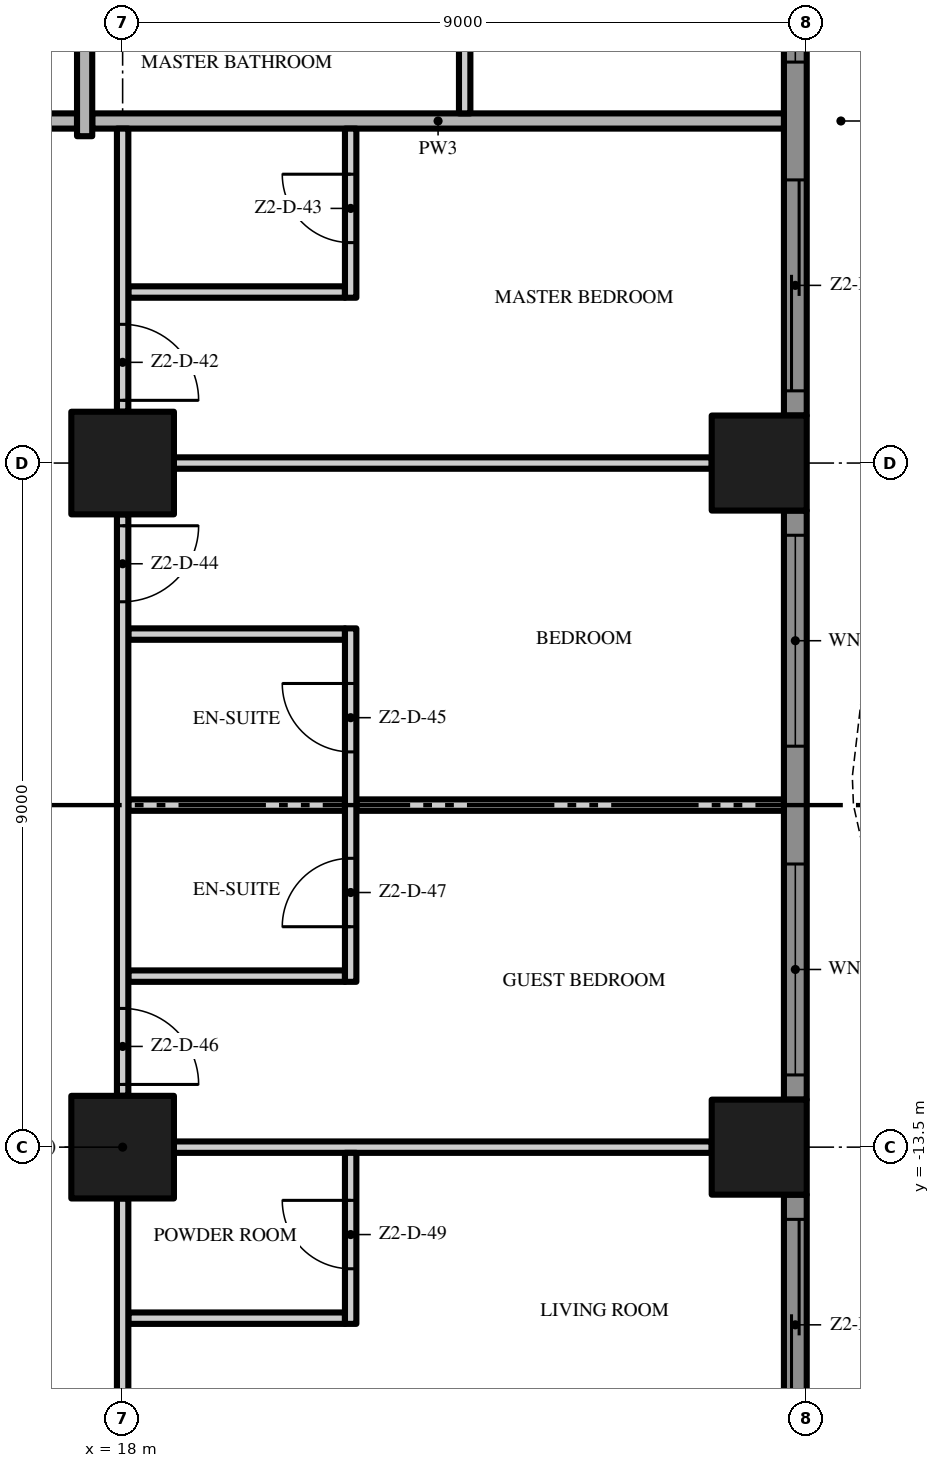
"""IFC4 building model, lengths in metres.
Left out: names, types, materials, properties, quantities, classifications, styles, units other than length and angle.
Written with IfcOpenShell. Run it as: python <this file> out.ifc"""

import sys

from ifc_helpers import new_model, si_unit, direction, frame, frame_2d, origin, origin_2d, place, context, subcontext, project, spatial, polyline, rectangle, outline, extrude, element, fill, save


model = new_model("IFC4")
c1 = context("Model", 3, precision=1e-05, world=origin(), true_north=direction((0.0, 1.0)))
c2 = subcontext(c1, "Body", "Model", "MODEL_VIEW")
j1 = project(units=[si_unit("LENGTHUNIT", "METRE"), si_unit("PLANEANGLEUNIT", "RADIAN")], contexts=[c1])
p1 = place(None, origin())
s1 = spatial("IfcSite", under=j1, at=p1, CompositionType="ELEMENT")
p2 = place(p1, origin())
s2 = spatial("IfcBuilding", under=s1, at=p2, CompositionType="ELEMENT")
p3 = place(p2, frame((0.0, 0.0, 111.2)))
s3 = spatial("IfcBuildingStorey", under=s2, at=p3, CompositionType="ELEMENT", Elevation=111.2)
for number, where, z_axis, x_axis in (
    (1, (18.0, -13.5, 0.0), (0.0, 0.0, 1.0), (1.0, 0.0, 0.0)),
    (2, (18.0, -4.5, 0.0), (0.0, 0.0, 1.0), (1.0, 0.0, 0.0)),
):
    element("IfcColumn", number, at=place(p3, frame(where, z_axis=z_axis, x_axis=x_axis)), inside=s3, PredefinedType="COLUMN", context=c2, shape_type="SweptSolid", body=[
        extrude(rectangle(XDim=1.35, YDim=1.35, at=origin_2d()), origin(), (0.0, 0.0, 1.0), 3.5),
    ])
for number, where, z_axis, x_axis in (
    (3, (26.375, -13.5, 0.0), (0.0, 0.0, 1.0), (1.0, 0.0, 0.0)),
    (4, (26.375, -4.5, 0.0), (0.0, 0.0, 1.0), (1.0, 0.0, 0.0)),
):
    element("IfcColumn", number, at=place(p3, frame(where, z_axis=z_axis, x_axis=x_axis)), inside=s3, PredefinedType="COLUMN", context=c2, shape_type="SweptSolid", body=[
        extrude(rectangle(XDim=1.25, YDim=1.25, at=origin_2d()), origin(), (0.0, 0.0, 1.0), 3.5),
    ])
p4 = place(p3, frame((26.85, -14.125, 0.0), z_axis=(0.0, 0.0, 1.0), x_axis=(0.0, -1.0, 0.0)))
e5 = element("IfcWall", 5, at=p4, inside=s3, PredefinedType="SOLIDWALL", context=c2, shape_type="SweptSolid", body=[
    extrude(rectangle(XDim=3.575, YDim=0.3, at=frame_2d((1.788, 0.0))), origin(), (0.0, 0.0, 1.0), 3.5),
])
p5 = place(p4, frame((0.325, 0.0, 0.0)))
e6 = element("IfcOpeningElement", 6, at=p5, cuts=e5, PredefinedType="OPENING", context=c2, shape_type="SweptSolid", body=[
    extrude(rectangle(XDim=2.775, YDim=2.4, at=frame_2d((1.387, 1.2))), frame((0.0, 0.16, 0.0), z_axis=(0.0, -1.0, 0.0), x_axis=(1.0, 0.0, 0.0)), (0.0, 0.0, 1.0), 0.32),
])
p6 = place(p3, frame((26.85, -5.125, 0.0), z_axis=(0.0, 0.0, 1.0), x_axis=(0.0, -1.0, 0.0)))
e7 = element("IfcWall", 7, at=p6, inside=s3, PredefinedType="SOLIDWALL", context=c2, shape_type="SweptSolid", body=[
    extrude(rectangle(XDim=7.75, YDim=0.3, at=frame_2d((3.875, 0.0))), origin(), (0.0, 0.0, 1.0), 3.5),
])
p7 = place(p6, frame((4.65, 0.0, 0.45)))
e8 = element("IfcOpeningElement", 8, at=p7, cuts=e7, PredefinedType="OPENING", context=c2, shape_type="SweptSolid", body=[
    extrude(rectangle(XDim=2.775, YDim=2.65, at=frame_2d((1.387, 1.325))), frame((0.0, 0.16, 0.0), z_axis=(0.0, -1.0, 0.0), x_axis=(1.0, 0.0, 0.0)), (0.0, 0.0, 1.0), 0.32),
])
p8 = place(p6, frame((0.325, 0.0, 0.45)))
e9 = element("IfcOpeningElement", 9, at=p8, cuts=e7, PredefinedType="OPENING", context=c2, shape_type="SweptSolid", body=[
    extrude(rectangle(XDim=2.775, YDim=2.65, at=frame_2d((1.387, 1.325))), frame((0.0, 0.16, 0.0), z_axis=(0.0, -1.0, 0.0), x_axis=(1.0, 0.0, 0.0)), (0.0, 0.0, 1.0), 0.32),
])
p9 = place(p3, frame((26.85, 3.875, 0.0), z_axis=(0.0, 0.0, 1.0), x_axis=(0.0, -1.0, 0.0)))
e10 = element("IfcWall", 10, at=p9, inside=s3, PredefinedType="SOLIDWALL", context=c2, shape_type="SweptSolid", body=[
    extrude(rectangle(XDim=7.75, YDim=0.3, at=frame_2d((3.875, 0.0))), origin(), (0.0, 0.0, 1.0), 3.5),
])
p10 = place(p9, frame((4.65, 0.0, 0.0)))
e11 = element("IfcOpeningElement", 11, at=p10, cuts=e10, PredefinedType="OPENING", context=c2, shape_type="SweptSolid", body=[
    extrude(rectangle(XDim=2.775, YDim=2.4, at=frame_2d((1.387, 1.2))), frame((0.0, 0.16, 0.0), z_axis=(0.0, -1.0, 0.0), x_axis=(1.0, 0.0, 0.0)), (0.0, 0.0, 1.0), 0.32),
])
p11 = place(p9, frame((0.325, 0.0, 0.45)))
e12 = element("IfcOpeningElement", 12, at=p11, cuts=e10, PredefinedType="OPENING", context=c2, shape_type="SweptSolid", body=[
    extrude(rectangle(XDim=2.775, YDim=2.65, at=frame_2d((1.387, 1.325))), frame((0.0, 0.16, 0.0), z_axis=(0.0, -1.0, 0.0), x_axis=(1.0, 0.0, 0.0)), (0.0, 0.0, 1.0), 0.32),
])
p12 = place(p3, origin())
e13 = element("IfcWall", 13, at=p12, inside=s3, PredefinedType="USERDEFINED", context=c2, shape_type="SweptSolid", body=[
    extrude(outline(polyline([(29.649, -18.0), (29.985, -16.5), (30.0, -16.125), (29.869, -15.0), (29.345, -13.5), (28.612, -12.0), (27.951, -10.5), (27.615, -9.0), (27.6, -8.625), (27.731, -7.5), (28.255, -6.0), (28.988, -4.5), (29.649, -3.0), (29.985, -1.5), (30.0, -1.125), (29.869, 0.0), (29.345, 1.5), (28.612, 3.0), (27.951, 4.5), (27.615, 6.0), (27.6, 6.375), (27.731, 7.5), (28.255, 9.0), (28.988, 10.5), (29.649, 12.0), (29.985, 13.5), (30.0, 13.875), (29.869, 15.0), (29.345, 16.5), (28.612, 18.0), (28.388, 17.89), (29.114, 16.404), (29.624, 14.944), (29.749, 13.865), (29.736, 13.533), (29.41, 12.079), (28.761, 10.605), (28.024, 9.096), (27.486, 7.556), (27.349, 6.385), (27.366, 5.967), (27.713, 4.421), (28.385, 2.895), (29.114, 1.404), (29.624, -0.056), (29.749, -1.135), (29.736, -1.467), (29.41, -2.921), (28.761, -4.395), (28.024, -5.904), (27.486, -7.444), (27.349, -8.615), (27.366, -9.033), (27.713, -10.579), (28.385, -12.105), (29.114, -13.596), (29.624, -15.056), (29.749, -16.135), (29.736, -16.467), (29.405, -17.945), (29.649, -18.0)])), origin(), (0.0, 0.0, 1.0), 0.9),
])
p13 = place(p3, frame((18.075, -15.75, 0.0), z_axis=(0.0, 0.0, 1.0), x_axis=(1.0, 0.0, 0.0)))
e14 = element("IfcWall", 14, at=p13, inside=s3, PredefinedType="PARTITIONING", context=c2, shape_type="SweptSolid", body=[
    extrude(rectangle(XDim=2.85, YDim=0.15, at=frame_2d((1.425, 0.0))), origin(), (0.0, 0.0, 1.0), 3.5),
])
p14 = place(p3, frame((18.675, -13.5, 0.0), z_axis=(0.0, 0.0, 1.0), x_axis=(1.0, 0.0, 0.0)))
e15 = element("IfcWall", 15, at=p14, inside=s3, PredefinedType="PARTITIONING", context=c2, shape_type="SweptSolid", body=[
    extrude(rectangle(XDim=7.075, YDim=0.15, at=frame_2d((3.538, 0.0))), origin(), (0.0, 0.0, 1.0), 3.5),
])
for number, where, z_axis, x_axis in (
    (16, (18.075, -11.25, 0.0), (0.0, 0.0, 1.0), (1.0, 0.0, 0.0)),
    (17, (18.075, -9.0, 0.0), (0.0, 0.0, 1.0), (1.0, 0.0, 0.0)),
):
    element("IfcWall", number, at=place(p3, frame(where, z_axis=z_axis, x_axis=x_axis)), inside=s3, PredefinedType="PARTITIONING", context=c2, shape_type="SweptSolid", body=[
        extrude(rectangle(XDim=2.85, YDim=0.15, at=frame_2d((1.425, 0.0))), origin(), (0.0, 0.0, 1.0), 3.5),
    ])
p15 = place(p3, frame((21.075, -9.0, 0.0), z_axis=(0.0, 0.0, 1.0), x_axis=(1.0, 0.0, 0.0)))
e18 = element("IfcWall", 18, at=p15, inside=s3, PredefinedType="PARTITIONING", context=c2, shape_type="SweptSolid", body=[
    extrude(rectangle(XDim=5.625, YDim=0.15, at=frame_2d((2.812, 0.0))), origin(), (0.0, 0.0, 1.0), 3.5),
])
p16 = place(p3, frame((18.075, -6.75, 0.0), z_axis=(0.0, 0.0, 1.0), x_axis=(1.0, 0.0, 0.0)))
e19 = element("IfcWall", 19, at=p16, inside=s3, PredefinedType="PARTITIONING", context=c2, shape_type="SweptSolid", body=[
    extrude(rectangle(XDim=2.85, YDim=0.15, at=frame_2d((1.425, 0.0))), origin(), (0.0, 0.0, 1.0), 3.5),
])
p17 = place(p3, frame((18.675, -4.5, 0.0), z_axis=(0.0, 0.0, 1.0), x_axis=(1.0, 0.0, 0.0)))
e20 = element("IfcWall", 20, at=p17, inside=s3, PredefinedType="PARTITIONING", context=c2, shape_type="SweptSolid", body=[
    extrude(rectangle(XDim=7.075, YDim=0.15, at=frame_2d((3.538, 0.0))), origin(), (0.0, 0.0, 1.0), 3.5),
])
p18 = place(p3, frame((18.075, -2.25, 0.0), z_axis=(0.0, 0.0, 1.0), x_axis=(1.0, 0.0, 0.0)))
e21 = element("IfcWall", 21, at=p18, inside=s3, PredefinedType="PARTITIONING", context=c2, shape_type="SweptSolid", body=[
    extrude(rectangle(XDim=2.85, YDim=0.15, at=frame_2d((1.425, 0.0))), origin(), (0.0, 0.0, 1.0), 3.5),
])
p19 = place(p3, frame((4.6, 0.0, 0.0), z_axis=(0.0, 0.0, 1.0), x_axis=(1.0, 0.0, 0.0)))
e22 = element("IfcWall", 22, at=p19, inside=s3, PredefinedType="PARTITIONING", context=c2, shape_type="SweptSolid", body=[
    extrude(rectangle(XDim=12.8, YDim=0.2, at=frame_2d((6.4, 0.0))), origin(), (0.0, 0.0, 1.0), 3.5),
])
p20 = place(p3, frame((17.6, 0.0, 0.0), z_axis=(0.0, 0.0, 1.0), x_axis=(1.0, 0.0, 0.0)))
e23 = element("IfcWall", 23, at=p20, inside=s3, PredefinedType="PARTITIONING", context=c2, shape_type="SweptSolid", body=[
    extrude(rectangle(XDim=9.1, YDim=0.2, at=frame_2d((4.55, 0.0))), origin(), (0.0, 0.0, 1.0), 3.5),
])
p21 = place(p3, frame((17.5, -0.2, 0.0), z_axis=(0.0, 0.0, 1.0), x_axis=(0.0, 1.0, 0.0)))
e24 = element("IfcWall", 24, at=p21, inside=s3, PredefinedType="PARTITIONING", context=c2, shape_type="SweptSolid", body=[
    extrude(rectangle(XDim=4.025, YDim=0.2, at=frame_2d((2.013, 0.0))), origin(), (0.0, 0.0, 1.0), 3.5),
])
p22 = place(p3, frame((18.0, -14.175, 0.0), z_axis=(0.0, 0.0, 1.0), x_axis=(0.0, -1.0, 0.0)))
e25 = element("IfcWall", 25, at=p22, inside=s3, PredefinedType="PARTITIONING", context=c2, shape_type="SweptSolid", body=[
    extrude(rectangle(XDim=7.075, YDim=0.15, at=frame_2d((3.538, 0.0))), origin(), (0.0, 0.0, 1.0), 3.5),
])
p23 = place(p22, frame((4.075, 0.0, 0.0)))
e26 = element("IfcOpeningElement", 26, at=p23, cuts=e25, PredefinedType="OPENING", context=c2, shape_type="SweptSolid", body=[
    extrude(rectangle(XDim=1.8, YDim=2.4, at=frame_2d((0.9, 1.2))), frame((0.0, 0.085, 0.0), z_axis=(0.0, -1.0, 0.0), x_axis=(1.0, 0.0, 0.0)), (0.0, 0.0, 1.0), 0.17),
])
p24 = place(p3, frame((18.0, -5.175, 0.0), z_axis=(0.0, 0.0, 1.0), x_axis=(0.0, -1.0, 0.0)))
e27 = element("IfcWall", 27, at=p24, inside=s3, PredefinedType="PARTITIONING", context=c2, shape_type="SweptSolid", body=[
    extrude(rectangle(XDim=7.65, YDim=0.15, at=frame_2d((3.825, 0.0))), origin(), (0.0, 0.0, 1.0), 3.5),
])
p25 = place(p24, frame((0.15, 0.0, 0.0)))
e28 = element("IfcOpeningElement", 28, at=p25, cuts=e27, PredefinedType="OPENING", context=c2, shape_type="SweptSolid", body=[
    extrude(rectangle(XDim=1.0, YDim=2.4, at=frame_2d((0.5, 1.2))), frame((0.0, 0.085, 0.0), z_axis=(0.0, -1.0, 0.0), x_axis=(1.0, 0.0, 0.0)), (0.0, 0.0, 1.0), 0.17),
])
p26 = place(p24, frame((6.5, 0.0, 0.0)))
e29 = element("IfcOpeningElement", 29, at=p26, cuts=e27, PredefinedType="OPENING", context=c2, shape_type="SweptSolid", body=[
    extrude(rectangle(XDim=1.0, YDim=2.4, at=frame_2d((0.5, 1.2))), frame((0.0, 0.085, 0.0), z_axis=(0.0, -1.0, 0.0), x_axis=(1.0, 0.0, 0.0)), (0.0, 0.0, 1.0), 0.17),
])
p27 = place(p3, frame((18.0, -0.1, 0.0), z_axis=(0.0, 0.0, 1.0), x_axis=(0.0, -1.0, 0.0)))
e30 = element("IfcWall", 30, at=p27, inside=s3, PredefinedType="PARTITIONING", context=c2, shape_type="SweptSolid", body=[
    extrude(rectangle(XDim=3.725, YDim=0.15, at=frame_2d((1.863, 0.0))), origin(), (0.0, 0.0, 1.0), 3.5),
])
p28 = place(p27, frame((2.575, 0.0, 0.0)))
e31 = element("IfcOpeningElement", 31, at=p28, cuts=e30, PredefinedType="OPENING", context=c2, shape_type="SweptSolid", body=[
    extrude(rectangle(XDim=1.0, YDim=2.4, at=frame_2d((0.5, 1.2))), frame((0.0, 0.085, 0.0), z_axis=(0.0, -1.0, 0.0), x_axis=(1.0, 0.0, 0.0)), (0.0, 0.0, 1.0), 0.17),
])
p29 = place(p3, frame((21.0, -15.825, 0.0), z_axis=(0.0, 0.0, 1.0), x_axis=(0.0, 1.0, 0.0)))
e32 = element("IfcWall", 32, at=p29, inside=s3, PredefinedType="PARTITIONING", context=c2, shape_type="SweptSolid", body=[
    extrude(rectangle(XDim=2.25, YDim=0.15, at=frame_2d((1.125, 0.0))), origin(), (0.0, 0.0, 1.0), 3.5),
])
p30 = place(p29, frame((0.725, 0.0, 0.0)))
e33 = element("IfcOpeningElement", 33, at=p30, cuts=e32, PredefinedType="OPENING", context=c2, shape_type="SweptSolid", body=[
    extrude(rectangle(XDim=0.9, YDim=2.1, at=frame_2d((0.45, 1.05))), frame((0.0, 0.085, 0.0), z_axis=(0.0, -1.0, 0.0), x_axis=(1.0, 0.0, 0.0)), (0.0, 0.0, 1.0), 0.17),
])
p31 = place(p3, frame((21.0, -11.325, 0.0), z_axis=(0.0, 0.0, 1.0), x_axis=(0.0, 1.0, 0.0)))
e34 = element("IfcWall", 34, at=p31, inside=s3, PredefinedType="PARTITIONING", context=c2, shape_type="SweptSolid", body=[
    extrude(rectangle(XDim=4.65, YDim=0.15, at=frame_2d((2.325, 0.0))), origin(), (0.0, 0.0, 1.0), 3.5),
])
p32 = place(p31, frame((3.025, 0.0, 0.0)))
e35 = element("IfcOpeningElement", 35, at=p32, cuts=e34, PredefinedType="OPENING", context=c2, shape_type="SweptSolid", body=[
    extrude(rectangle(XDim=0.9, YDim=2.1, at=frame_2d((0.45, 1.05))), frame((0.0, 0.085, 0.0), z_axis=(0.0, -1.0, 0.0), x_axis=(1.0, 0.0, 0.0)), (0.0, 0.0, 1.0), 0.17),
])
p33 = place(p31, frame((0.725, 0.0, 0.0)))
e36 = element("IfcOpeningElement", 36, at=p33, cuts=e34, PredefinedType="OPENING", context=c2, shape_type="SweptSolid", body=[
    extrude(rectangle(XDim=0.9, YDim=2.1, at=frame_2d((0.45, 1.05))), frame((0.0, 0.085, 0.0), z_axis=(0.0, -1.0, 0.0), x_axis=(1.0, 0.0, 0.0)), (0.0, 0.0, 1.0), 0.17),
])
p34 = place(p3, frame((21.0, -2.325, 0.0), z_axis=(0.0, 0.0, 1.0), x_axis=(0.0, 1.0, 0.0)))
e37 = element("IfcWall", 37, at=p34, inside=s3, PredefinedType="PARTITIONING", context=c2, shape_type="SweptSolid", body=[
    extrude(rectangle(XDim=2.225, YDim=0.15, at=frame_2d((1.113, 0.0))), origin(), (0.0, 0.0, 1.0), 3.5),
])
p35 = place(p34, frame((0.725, 0.0, 0.0)))
e38 = element("IfcOpeningElement", 38, at=p35, cuts=e37, PredefinedType="OPENING", context=c2, shape_type="SweptSolid", body=[
    extrude(rectangle(XDim=0.9, YDim=2.1, at=frame_2d((0.45, 1.05))), frame((0.0, 0.085, 0.0), z_axis=(0.0, -1.0, 0.0), x_axis=(1.0, 0.0, 0.0)), (0.0, 0.0, 1.0), 0.17),
])
p36 = place(p3, frame((22.5, 17.375, 0.0), z_axis=(0.0, 0.0, 1.0), x_axis=(0.0, -1.0, 0.0)))
e39 = element("IfcWall", 39, at=p36, inside=s3, PredefinedType="PARTITIONING", context=c2, shape_type="SweptSolid", body=[
    extrude(rectangle(XDim=17.275, YDim=0.15, at=frame_2d((8.637, 0.0))), origin(), (0.0, 0.0, 1.0), 3.5),
])
p37 = place(p36, frame((14.625, 0.0, 0.0)))
e40 = element("IfcOpeningElement", 40, at=p37, cuts=e39, PredefinedType="OPENING", context=c2, shape_type="SweptSolid", body=[
    extrude(rectangle(XDim=1.0, YDim=2.4, at=frame_2d((0.5, 1.2))), frame((0.0, 0.085, 0.0), z_axis=(0.0, -1.0, 0.0), x_axis=(1.0, 0.0, 0.0)), (0.0, 0.0, 1.0), 0.17),
])
p38 = place(p36, frame((9.025, 0.0, 0.0)))
e41 = element("IfcOpeningElement", 41, at=p38, cuts=e39, PredefinedType="OPENING", context=c2, shape_type="SweptSolid", body=[
    extrude(rectangle(XDim=1.0, YDim=2.4, at=frame_2d((0.5, 1.2))), frame((0.0, 0.085, 0.0), z_axis=(0.0, -1.0, 0.0), x_axis=(1.0, 0.0, 0.0)), (0.0, 0.0, 1.0), 0.17),
])
p39 = place(p36, frame((6.775, 0.0, 0.0)))
e42 = element("IfcOpeningElement", 42, at=p39, cuts=e39, PredefinedType="OPENING", context=c2, shape_type="SweptSolid", body=[
    extrude(rectangle(XDim=1.0, YDim=2.4, at=frame_2d((0.5, 1.2))), frame((0.0, 0.085, 0.0), z_axis=(0.0, -1.0, 0.0), x_axis=(1.0, 0.0, 0.0)), (0.0, 0.0, 1.0), 0.17),
])
p40 = place(p36, frame((0.15, 0.0, 0.0)))
e43 = element("IfcOpeningElement", 43, at=p40, cuts=e39, PredefinedType="OPENING", context=c2, shape_type="SweptSolid", body=[
    extrude(rectangle(XDim=1.0, YDim=2.4, at=frame_2d((0.5, 1.2))), frame((0.0, 0.085, 0.0), z_axis=(0.0, -1.0, 0.0), x_axis=(1.0, 0.0, 0.0)), (0.0, 0.0, 1.0), 0.17),
])
p41 = place(p5, origin())
e44 = element("IfcDoor", 44, at=p41, inside=s3, OperationType="SINGLE_SWING_LEFT", PredefinedType="DOOR", context=c2, shape_type="SweptSolid", body=[
    extrude(rectangle(XDim=2.775, YDim=2.4, at=frame_2d((1.387, 1.2))), frame((0.0, 0.025, 0.0), z_axis=(0.0, -1.0, 0.0), x_axis=(1.0, 0.0, 0.0)), (0.0, 0.0, 1.0), 0.05),
])
fill(e6, e44)
p42 = place(p7, origin())
e45 = element("IfcWindow", 45, at=p42, inside=s3, PartitioningType="SINGLE_PANEL", PredefinedType="WINDOW", context=c2, shape_type="SweptSolid", body=[
    extrude(rectangle(XDim=2.775, YDim=2.65, at=frame_2d((1.387, 1.325))), frame((0.0, 0.03, 0.0), z_axis=(0.0, -1.0, 0.0), x_axis=(1.0, 0.0, 0.0)), (0.0, 0.0, 1.0), 0.06),
])
fill(e8, e45)
p43 = place(p8, origin())
e46 = element("IfcWindow", 46, at=p43, inside=s3, PartitioningType="SINGLE_PANEL", PredefinedType="WINDOW", context=c2, shape_type="SweptSolid", body=[
    extrude(rectangle(XDim=2.775, YDim=2.65, at=frame_2d((1.387, 1.325))), frame((0.0, 0.03, 0.0), z_axis=(0.0, -1.0, 0.0), x_axis=(1.0, 0.0, 0.0)), (0.0, 0.0, 1.0), 0.06),
])
fill(e9, e46)
p44 = place(p10, origin())
e47 = element("IfcDoor", 47, at=p44, inside=s3, OperationType="SINGLE_SWING_LEFT", PredefinedType="DOOR", context=c2, shape_type="SweptSolid", body=[
    extrude(rectangle(XDim=2.775, YDim=2.4, at=frame_2d((1.387, 1.2))), frame((0.0, 0.025, 0.0), z_axis=(0.0, -1.0, 0.0), x_axis=(1.0, 0.0, 0.0)), (0.0, 0.0, 1.0), 0.05),
])
fill(e11, e47)
p45 = place(p11, origin())
e48 = element("IfcWindow", 48, at=p45, inside=s3, PartitioningType="SINGLE_PANEL", PredefinedType="WINDOW", context=c2, shape_type="SweptSolid", body=[
    extrude(rectangle(XDim=2.775, YDim=2.65, at=frame_2d((1.387, 1.325))), frame((0.0, 0.03, 0.0), z_axis=(0.0, -1.0, 0.0), x_axis=(1.0, 0.0, 0.0)), (0.0, 0.0, 1.0), 0.06),
])
fill(e12, e48)
p46 = place(p28, origin())
e49 = element("IfcDoor", 49, at=p46, inside=s3, OperationType="SINGLE_SWING_RIGHT", PredefinedType="DOOR", context=c2, shape_type="SweptSolid", body=[
    extrude(rectangle(XDim=1.0, YDim=2.4, at=frame_2d((0.5, 1.2))), frame((0.0, 0.025, 0.0), z_axis=(0.0, -1.0, 0.0), x_axis=(1.0, 0.0, 0.0)), (0.0, 0.0, 1.0), 0.05),
])
fill(e31, e49)
p47 = place(p35, origin())
e50 = element("IfcDoor", 50, at=p47, inside=s3, OperationType="SINGLE_SWING_RIGHT", PredefinedType="DOOR", context=c2, shape_type="SweptSolid", body=[
    extrude(rectangle(XDim=0.9, YDim=2.1, at=frame_2d((0.45, 1.05))), frame((0.0, 0.025, 0.0), z_axis=(0.0, -1.0, 0.0), x_axis=(1.0, 0.0, 0.0)), (0.0, 0.0, 1.0), 0.05),
])
fill(e38, e50)
p48 = place(p25, origin())
e51 = element("IfcDoor", 51, at=p48, inside=s3, OperationType="SINGLE_SWING_LEFT", PredefinedType="DOOR", context=c2, shape_type="SweptSolid", body=[
    extrude(rectangle(XDim=1.0, YDim=2.4, at=frame_2d((0.5, 1.2))), frame((0.0, 0.025, 0.0), z_axis=(0.0, -1.0, 0.0), x_axis=(1.0, 0.0, 0.0)), (0.0, 0.0, 1.0), 0.05),
])
fill(e28, e51)
p49 = place(p32, origin())
e52 = element("IfcDoor", 52, at=p49, inside=s3, OperationType="SINGLE_SWING_RIGHT", PredefinedType="DOOR", context=c2, shape_type="SweptSolid", body=[
    extrude(rectangle(XDim=0.9, YDim=2.1, at=frame_2d((0.45, 1.05))), frame((0.0, 0.025, 0.0), z_axis=(0.0, -1.0, 0.0), x_axis=(1.0, 0.0, 0.0)), (0.0, 0.0, 1.0), 0.05),
])
fill(e35, e52)
p50 = place(p26, origin())
e53 = element("IfcDoor", 53, at=p50, inside=s3, OperationType="SINGLE_SWING_RIGHT", PredefinedType="DOOR", context=c2, shape_type="SweptSolid", body=[
    extrude(rectangle(XDim=1.0, YDim=2.4, at=frame_2d((0.5, 1.2))), frame((0.0, 0.025, 0.0), z_axis=(0.0, -1.0, 0.0), x_axis=(1.0, 0.0, 0.0)), (0.0, 0.0, 1.0), 0.05),
])
fill(e29, e53)
p51 = place(p33, origin())
e54 = element("IfcDoor", 54, at=p51, inside=s3, OperationType="SINGLE_SWING_LEFT", PredefinedType="DOOR", context=c2, shape_type="SweptSolid", body=[
    extrude(rectangle(XDim=0.9, YDim=2.1, at=frame_2d((0.45, 1.05))), frame((0.0, 0.025, 0.0), z_axis=(0.0, -1.0, 0.0), x_axis=(1.0, 0.0, 0.0)), (0.0, 0.0, 1.0), 0.05),
])
fill(e36, e54)
p52 = place(p30, origin())
e55 = element("IfcDoor", 55, at=p52, inside=s3, OperationType="SINGLE_SWING_RIGHT", PredefinedType="DOOR", context=c2, shape_type="SweptSolid", body=[
    extrude(rectangle(XDim=0.9, YDim=2.1, at=frame_2d((0.45, 1.05))), frame((0.0, 0.025, 0.0), z_axis=(0.0, -1.0, 0.0), x_axis=(1.0, 0.0, 0.0)), (0.0, 0.0, 1.0), 0.05),
])
fill(e33, e55)
save(model, sys.argv[1])
